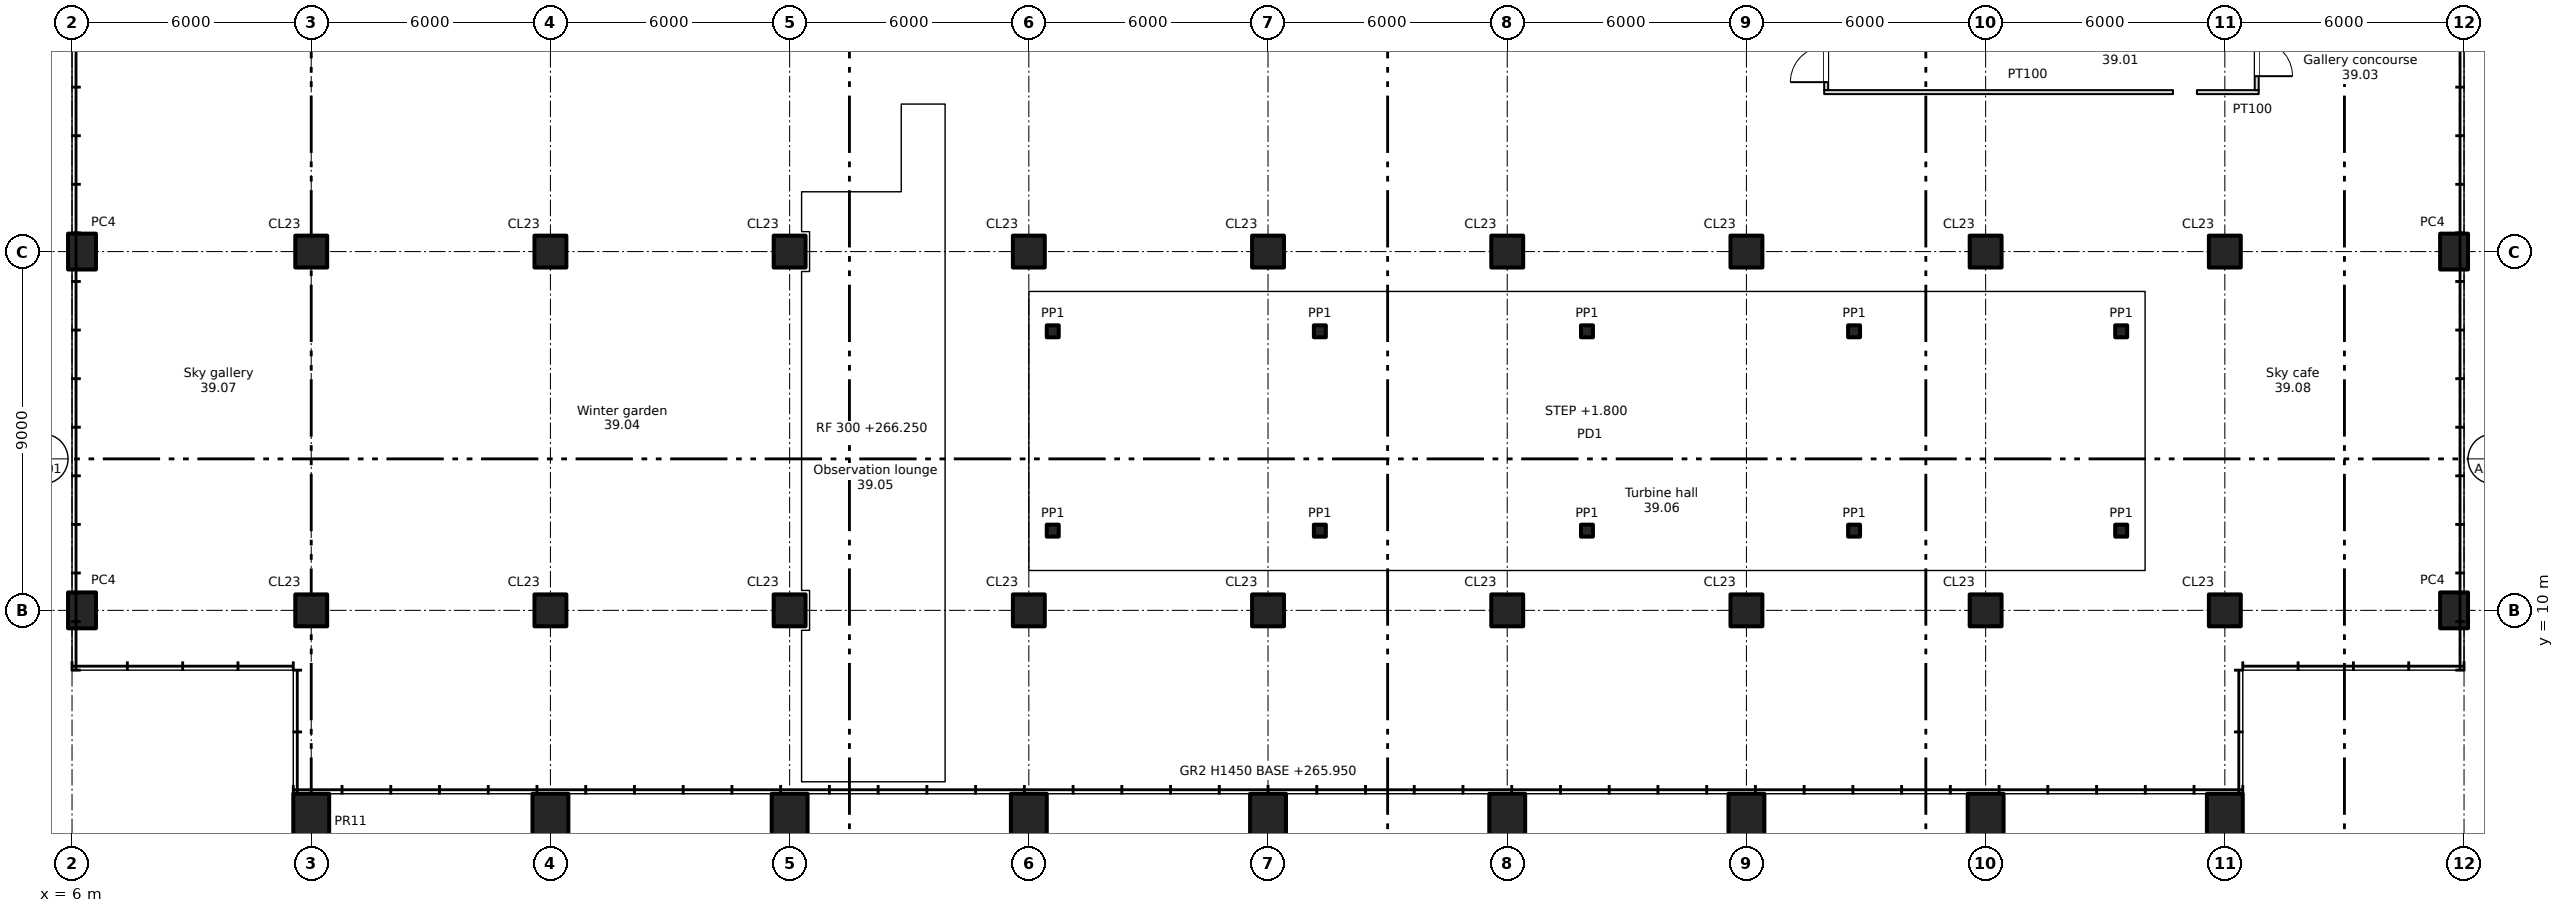
"""IFC4 building model, lengths in metres.
Left out: names, types, materials, properties, quantities, classifications, styles, units other than length and angle.
Written with IfcOpenShell. Run it as: python <this file> out.ifc"""

import sys

from ifc_helpers import new_model, si_unit, direction, frame, frame_2d, origin, origin_2d, place, context, subcontext, project, spatial, rectangle, i_section, extrude, element, fill, save


model = new_model("IFC4")
c1 = context("Model", 3, precision=1e-05, world=origin(), true_north=direction((0.0, 1.0)))
c2 = subcontext(c1, "Body", "Model", "MODEL_VIEW")
j1 = project(units=[si_unit("LENGTHUNIT", "METRE"), si_unit("PLANEANGLEUNIT", "RADIAN")], contexts=[c1])
p1 = place(None, origin())
s1 = spatial("IfcSite", under=j1, at=p1, CompositionType="ELEMENT")
p2 = place(p1, origin())
s2 = spatial("IfcBuilding", under=s1, at=p2, CompositionType="ELEMENT")
p3 = place(p2, frame((0.0, 0.0, 265.95)))
s3 = spatial("IfcBuildingStorey", under=s2, at=p3, CompositionType="ELEMENT", Elevation=265.95)
for number, where, z_axis, x_axis in (
    (1, (12.0, 4.7, -0.6), (0.0, 0.0, 1.0), (1.0, 0.0, 0.0)),
    (2, (18.0, 4.7, -0.6), (0.0, 0.0, 1.0), (1.0, 0.0, 0.0)),
    (3, (24.0, 4.7, -0.6), (0.0, 0.0, 1.0), (1.0, 0.0, 0.0)),
    (4, (30.0, 4.7, -0.6), (0.0, 0.0, 1.0), (1.0, 0.0, 0.0)),
    (5, (36.0, 4.7, -0.6), (0.0, 0.0, 1.0), (1.0, 0.0, 0.0)),
    (6, (42.0, 4.7, -0.6), (0.0, 0.0, 1.0), (1.0, 0.0, 0.0)),
    (7, (48.0, 4.7, -0.6), (0.0, 0.0, 1.0), (1.0, 0.0, 0.0)),
    (8, (54.0, 4.7, -0.6), (0.0, 0.0, 1.0), (1.0, 0.0, 0.0)),
    (9, (60.0, 4.7, -0.6), (0.0, 0.0, 1.0), (1.0, 0.0, 0.0)),
):
    element("IfcColumn", number, at=place(p3, frame(where, z_axis=z_axis, x_axis=x_axis)), inside=s3, PredefinedType="COLUMN", context=c2, shape_type="SweptSolid", body=[
        extrude(rectangle(XDim=0.9, YDim=1.4, at=origin_2d()), origin(), (0.0, 0.0, 1.0), 6.0),
    ])
for number, where, z_axis, x_axis in (
    (10, (12.0, 10.0, 0.0), (0.0, 0.0, 1.0), (1.0, 0.0, 0.0)),
    (11, (12.0, 19.0, 0.0), (0.0, 0.0, 1.0), (1.0, 0.0, 0.0)),
    (12, (18.0, 10.0, 0.0), (0.0, 0.0, 1.0), (1.0, 0.0, 0.0)),
    (13, (18.0, 19.0, 0.0), (0.0, 0.0, 1.0), (1.0, 0.0, 0.0)),
    (14, (24.0, 10.0, 0.0), (0.0, 0.0, 1.0), (1.0, 0.0, 0.0)),
    (15, (24.0, 19.0, 0.0), (0.0, 0.0, 1.0), (1.0, 0.0, 0.0)),
    (16, (30.0, 10.0, 0.0), (0.0, 0.0, 1.0), (1.0, 0.0, 0.0)),
    (17, (30.0, 19.0, 0.0), (0.0, 0.0, 1.0), (1.0, 0.0, 0.0)),
    (18, (36.0, 10.0, 0.0), (0.0, 0.0, 1.0), (1.0, 0.0, 0.0)),
    (19, (36.0, 19.0, 0.0), (0.0, 0.0, 1.0), (1.0, 0.0, 0.0)),
    (20, (42.0, 10.0, 0.0), (0.0, 0.0, 1.0), (1.0, 0.0, 0.0)),
    (21, (42.0, 19.0, 0.0), (0.0, 0.0, 1.0), (1.0, 0.0, 0.0)),
    (22, (48.0, 10.0, 0.0), (0.0, 0.0, 1.0), (1.0, 0.0, 0.0)),
    (23, (48.0, 19.0, 0.0), (0.0, 0.0, 1.0), (1.0, 0.0, 0.0)),
    (24, (54.0, 10.0, 0.0), (0.0, 0.0, 1.0), (1.0, 0.0, 0.0)),
    (25, (54.0, 19.0, 0.0), (0.0, 0.0, 1.0), (1.0, 0.0, 0.0)),
    (26, (60.0, 10.0, 0.0), (0.0, 0.0, 1.0), (1.0, 0.0, 0.0)),
    (27, (60.0, 19.0, 0.0), (0.0, 0.0, 1.0), (1.0, 0.0, 0.0)),
):
    element("IfcColumn", number, at=place(p3, frame(where, z_axis=z_axis, x_axis=x_axis)), inside=s3, PredefinedType="COLUMN", context=c2, shape_type="SweptSolid", body=[
        extrude(rectangle(XDim=0.8, YDim=0.8, at=origin_2d()), origin(), (0.0, 0.0, 1.0), 5.4),
    ])
for number, where, z_axis, x_axis in (
    (28, (6.25, 10.0, 0.0), (0.0, 0.0, 1.0), (1.0, 0.0, 0.0)),
    (29, (6.25, 19.0, 0.0), (0.0, 0.0, 1.0), (1.0, 0.0, 0.0)),
    (30, (65.75, 10.0, 0.0), (0.0, 0.0, 1.0), (1.0, 0.0, 0.0)),
    (31, (65.75, 19.0, 0.0), (0.0, 0.0, 1.0), (1.0, 0.0, 0.0)),
):
    element("IfcColumn", number, at=place(p3, frame(where, z_axis=z_axis, x_axis=x_axis)), inside=s3, PredefinedType="COLUMN", context=c2, shape_type="SweptSolid", body=[
        extrude(rectangle(XDim=0.7, YDim=0.9, at=origin_2d()), origin(), (0.0, 0.0, 1.0), 5.4),
    ])
for number, where, z_axis, x_axis in (
    (32, (30.6, 12.0, 0.0), (0.0, 0.0, 1.0), (1.0, 0.0, 0.0)),
    (33, (37.3, 12.0, 0.0), (0.0, 0.0, 1.0), (1.0, 0.0, 0.0)),
    (34, (44.0, 12.0, 0.0), (0.0, 0.0, 1.0), (1.0, 0.0, 0.0)),
    (35, (50.7, 12.0, 0.0), (0.0, 0.0, 1.0), (1.0, 0.0, 0.0)),
    (36, (57.4, 12.0, 0.0), (0.0, 0.0, 1.0), (1.0, 0.0, 0.0)),
    (37, (30.6, 17.0, 0.0), (0.0, 0.0, 1.0), (1.0, 0.0, 0.0)),
    (38, (37.3, 17.0, 0.0), (0.0, 0.0, 1.0), (1.0, 0.0, 0.0)),
    (39, (44.0, 17.0, 0.0), (0.0, 0.0, 1.0), (1.0, 0.0, 0.0)),
    (40, (50.7, 17.0, 0.0), (0.0, 0.0, 1.0), (1.0, 0.0, 0.0)),
    (41, (57.4, 17.0, 0.0), (0.0, 0.0, 1.0), (1.0, 0.0, 0.0)),
):
    element("IfcColumn", number, at=place(p3, frame(where, z_axis=z_axis, x_axis=x_axis)), inside=s3, PredefinedType="COLUMN", context=c2, shape_type="SweptSolid", body=[
        extrude(i_section(OverallWidth=0.3, OverallDepth=0.3, WebThickness=0.011, FlangeThickness=0.019, FilletRadius=0.027, at=origin_2d()), origin(), (0.0, 0.0, 1.0), 0.85),
    ])
p4 = place(p3, frame((49.95, 23.0, 0.0), z_axis=(0.0, 0.0, 1.0), x_axis=(1.0, 0.0, 0.0)))
e42 = element("IfcWall", 42, at=p4, inside=s3, PredefinedType="PARTITIONING", context=c2, shape_type="SweptSolid", body=[
    extrude(rectangle(XDim=8.75, YDim=0.1, at=frame_2d((4.375, 0.0))), origin(), (0.0, 0.0, 1.0), 5.4),
])
p5 = place(p3, frame((59.3, 23.0, 0.0), z_axis=(0.0, 0.0, 1.0), x_axis=(1.0, 0.0, 0.0)))
e43 = element("IfcWall", 43, at=p5, inside=s3, PredefinedType="PARTITIONING", context=c2, shape_type="SweptSolid", body=[
    extrude(rectangle(XDim=1.55, YDim=0.1, at=frame_2d((0.775, 0.0))), origin(), (0.0, 0.0, 1.0), 5.4),
])
p6 = place(p3, frame((50.0, 23.05, 0.0), z_axis=(0.0, 0.0, 1.0), x_axis=(0.0, 1.0, 0.0)))
e44 = element("IfcWall", 44, at=p6, inside=s3, PredefinedType="PARTITIONING", context=c2, shape_type="SweptSolid", body=[
    extrude(rectangle(XDim=4.95, YDim=0.1, at=frame_2d((2.475, 0.0))), origin(), (0.0, 0.0, 1.0), 5.4),
])
p7 = place(p6, frame((0.2, 0.0, 0.0)))
e45 = element("IfcOpeningElement", 45, at=p7, cuts=e44, PredefinedType="OPENING", context=c2, shape_type="SweptSolid", body=[
    extrude(rectangle(XDim=1.8, YDim=2.1, at=frame_2d((0.9, 1.05))), frame((0.0, 0.06, 0.0), z_axis=(0.0, -1.0, 0.0), x_axis=(1.0, 0.0, 0.0)), (0.0, 0.0, 1.0), 0.12),
])
p8 = place(p3, frame((60.8, 23.05, 0.0), z_axis=(0.0, 0.0, 1.0), x_axis=(0.0, 1.0, 0.0)))
e46 = element("IfcWall", 46, at=p8, inside=s3, PredefinedType="PARTITIONING", context=c2, shape_type="SweptSolid", body=[
    extrude(rectangle(XDim=4.95, YDim=0.1, at=frame_2d((2.475, 0.0))), origin(), (0.0, 0.0, 1.0), 5.4),
])
p9 = place(p8, frame((0.35, 0.0, 0.0)))
e47 = element("IfcOpeningElement", 47, at=p9, cuts=e46, PredefinedType="OPENING", context=c2, shape_type="SweptSolid", body=[
    extrude(rectangle(XDim=1.8, YDim=2.1, at=frame_2d((0.9, 1.05))), frame((0.0, 0.06, 0.0), z_axis=(0.0, -1.0, 0.0), x_axis=(1.0, 0.0, 0.0)), (0.0, 0.0, 1.0), 0.12),
])
p10 = place(p8, frame((3.25, 0.0, 0.0)))
e48 = element("IfcOpeningElement", 48, at=p10, cuts=e46, PredefinedType="OPENING", context=c2, shape_type="SweptSolid", body=[
    extrude(rectangle(XDim=1.0, YDim=2.1, at=frame_2d((0.5, 1.05))), frame((0.0, 0.06, 0.0), z_axis=(0.0, -1.0, 0.0), x_axis=(1.0, 0.0, 0.0)), (0.0, 0.0, 1.0), 0.12),
])
p11 = place(p7, origin())
e49 = element("IfcDoor", 49, at=p11, inside=s3, OperationType="DOUBLE_DOOR_SINGLE_SWING", PredefinedType="DOOR", context=c2, shape_type="SweptSolid", body=[
    extrude(rectangle(XDim=1.8, YDim=2.1, at=frame_2d((0.9, 1.05))), frame((0.0, 0.025, 0.0), z_axis=(0.0, -1.0, 0.0), x_axis=(1.0, 0.0, 0.0)), (0.0, 0.0, 1.0), 0.05),
])
fill(e45, e49)
p12 = place(p9, origin())
e50 = element("IfcDoor", 50, at=p12, inside=s3, OperationType="DOUBLE_DOOR_SINGLE_SWING", PredefinedType="DOOR", context=c2, shape_type="SweptSolid", body=[
    extrude(rectangle(XDim=1.8, YDim=2.1, at=frame_2d((0.9, 1.05))), frame((0.0, 0.025, 0.0), z_axis=(0.0, -1.0, 0.0), x_axis=(1.0, 0.0, 0.0)), (0.0, 0.0, 1.0), 0.05),
])
fill(e47, e50)
save(model, sys.argv[1])
